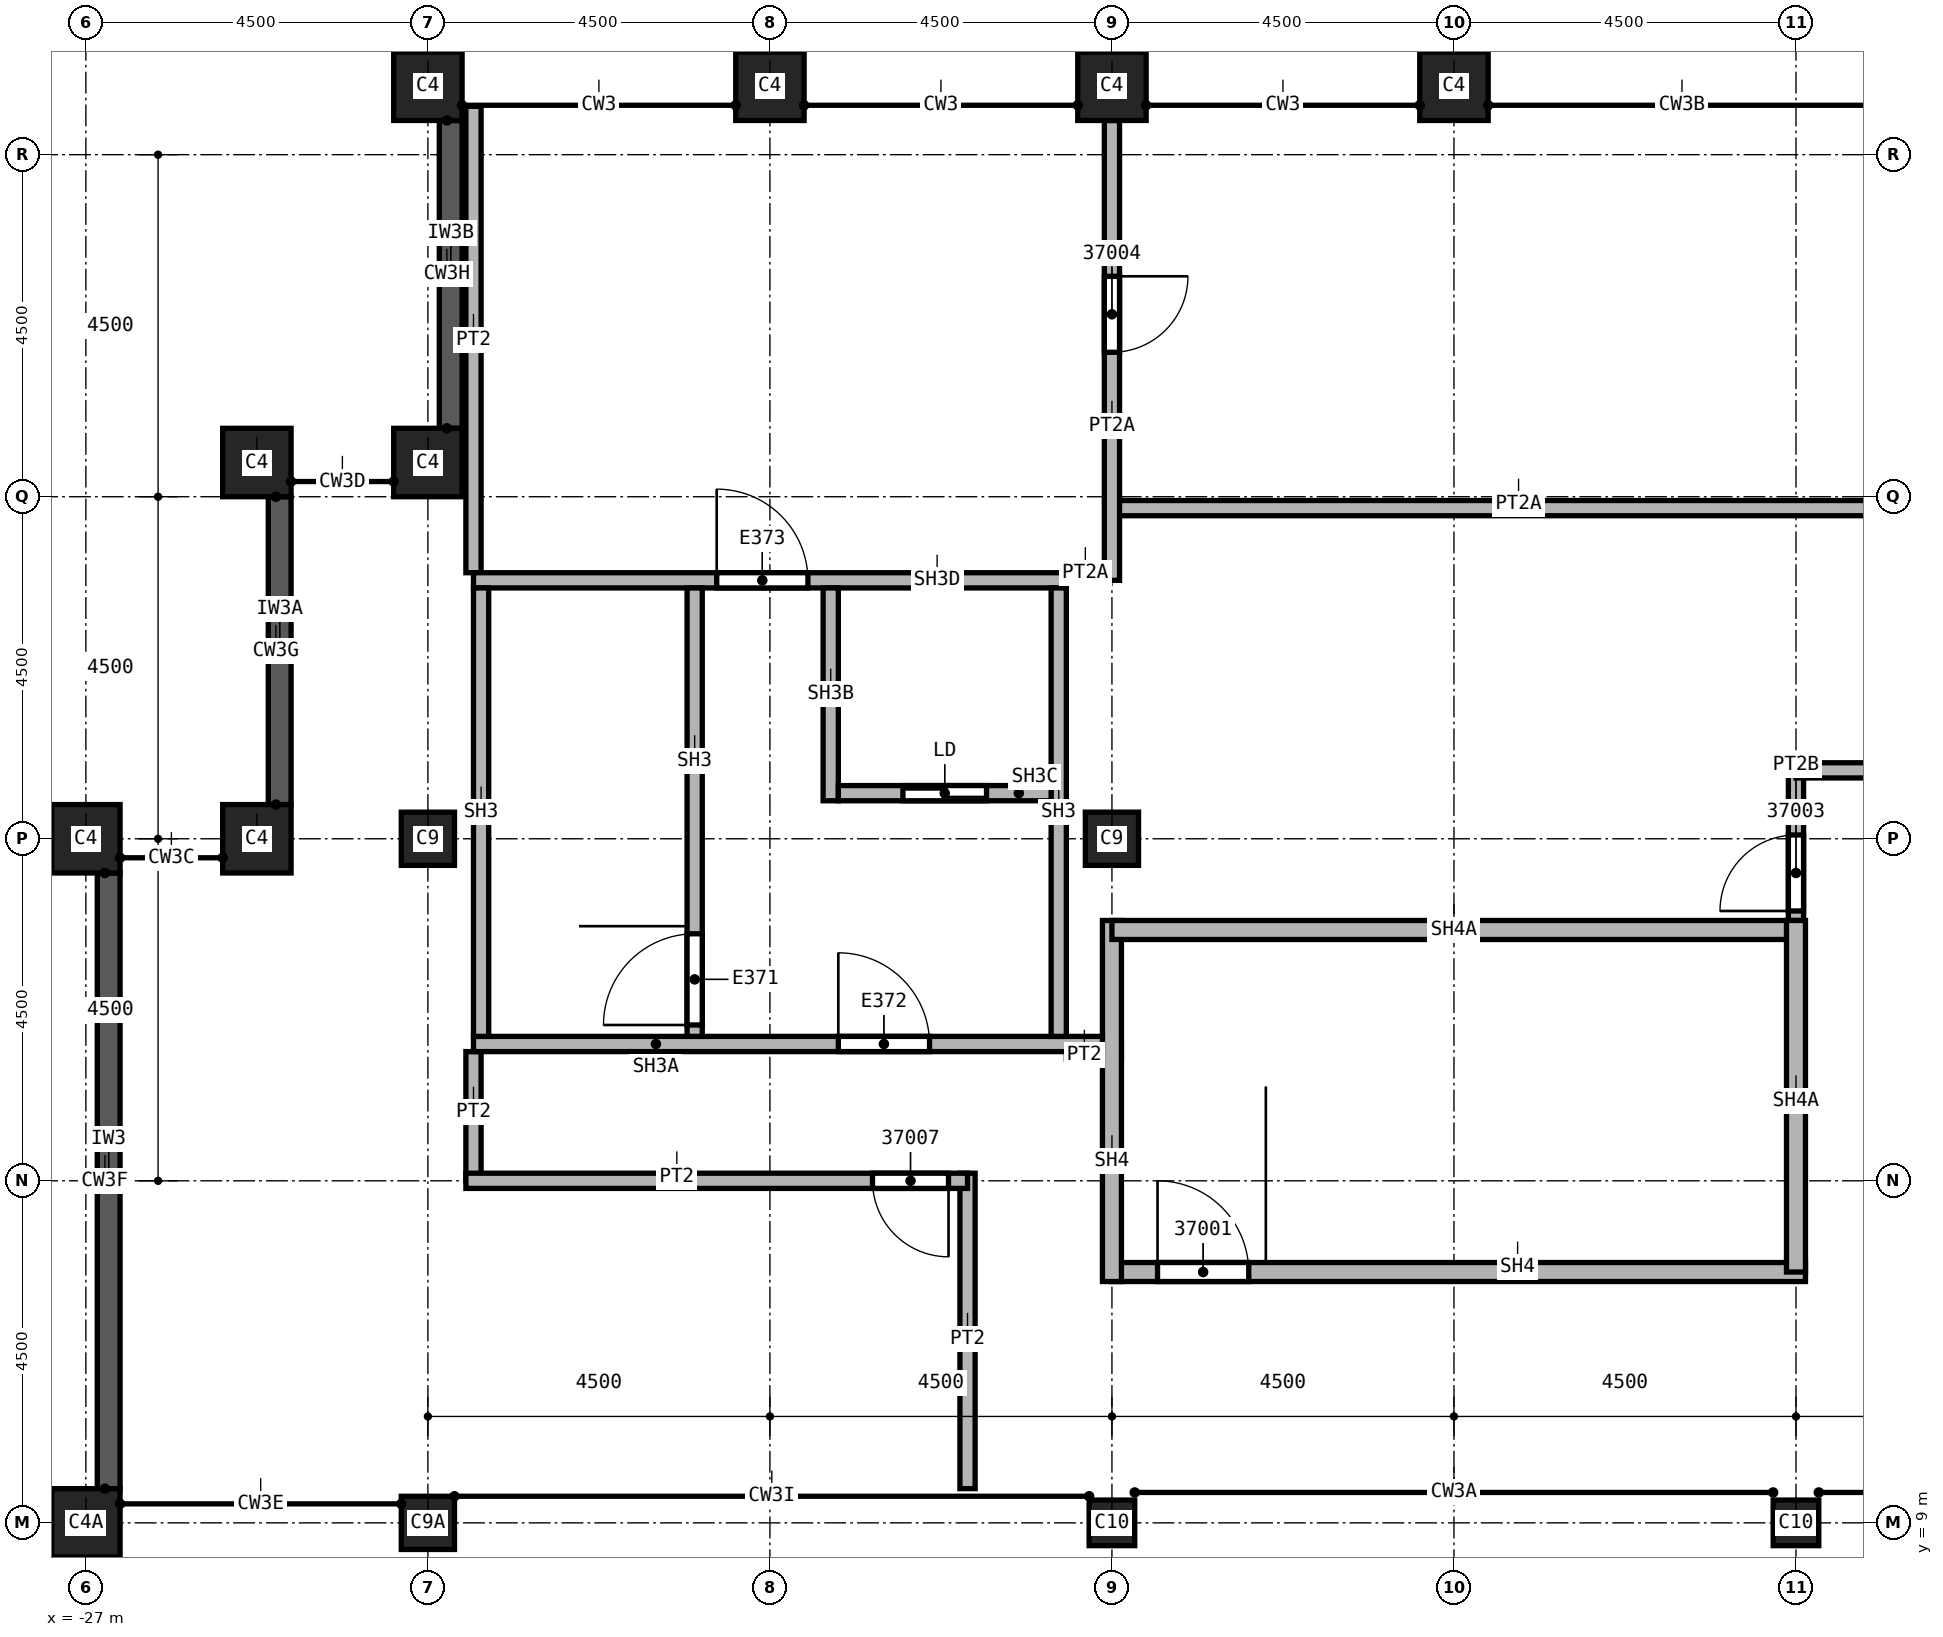
"""IFC4 building model, lengths in metres.
Left out: names, types, materials, properties, quantities, classifications, styles, units other than length and angle.
Written with IfcOpenShell. Run it as: python <this file> out.ifc"""

import sys

from ifc_helpers import new_model, si_unit, direction, frame, frame_2d, origin, origin_2d, place, context, subcontext, project, spatial, polyline, rectangle, outline, extrude, element, fill, save


model = new_model("IFC4")
c1 = context("Model", 3, precision=1e-05, world=origin(), true_north=direction((0.0, 1.0)))
c2 = subcontext(c1, "Body", "Model", "MODEL_VIEW")
j1 = project(units=[si_unit("LENGTHUNIT", "METRE"), si_unit("PLANEANGLEUNIT", "RADIAN")], contexts=[c1])
p1 = place(None, origin())
s1 = spatial("IfcSite", under=j1, at=p1, CompositionType="ELEMENT")
p2 = place(p1, origin())
s2 = spatial("IfcBuilding", under=s1, at=p2, CompositionType="ELEMENT")
p3 = place(p2, frame((0.0, 0.0, 386.0)))
s3 = spatial("IfcBuildingStorey", under=s2, at=p3, CompositionType="ELEMENT", Elevation=386.0)
p4 = place(p3, frame((-13.5, 18.0, 0.0), z_axis=(0.0, 0.0, 1.0), x_axis=(1.0, 0.0, 0.0)))
e1 = element("IfcColumn", 1, at=p4, inside=s3, PredefinedType="COLUMN", context=c2, shape_type="SweptSolid", body=[
    extrude(rectangle(XDim=0.7, YDim=0.7, at=origin_2d()), origin(), (0.0, 0.0, 1.0), 5.0),
])
p5 = place(p3, frame((-22.5, 9.0, 0.0), z_axis=(0.0, 0.0, 1.0), x_axis=(1.0, 0.0, 0.0)))
e2 = element("IfcColumn", 2, at=p5, inside=s3, PredefinedType="COLUMN", context=c2, shape_type="SweptSolid", body=[
    extrude(rectangle(XDim=0.7, YDim=0.7, at=origin_2d()), origin(), (0.0, 0.0, 1.0), 2.113),
])
p6 = place(p3, frame((-22.5, 18.0, 0.0), z_axis=(0.0, 0.0, 1.0), x_axis=(1.0, 0.0, 0.0)))
e3 = element("IfcColumn", 3, at=p6, inside=s3, PredefinedType="COLUMN", context=c2, shape_type="SweptSolid", body=[
    extrude(rectangle(XDim=0.7, YDim=0.7, at=origin_2d()), origin(), (0.0, 0.0, 1.0), 5.0),
])
for number, where, z_axis, x_axis in (
    (4, (-4.5, 9.0, 0.0), (0.0, 0.0, 1.0), (1.0, 0.0, 0.0)),
    (5, (-13.5, 9.0, 0.0), (0.0, 0.0, 1.0), (1.0, 0.0, 0.0)),
):
    element("IfcColumn", number, at=place(p3, frame(where, z_axis=z_axis, x_axis=x_axis)), inside=s3, PredefinedType="COLUMN", context=c2, shape_type="SweptSolid", body=[
        extrude(rectangle(XDim=0.6, YDim=0.6, at=origin_2d()), origin(), (0.0, 0.0, 1.0), 2.113),
    ])
for number, where, z_axis, x_axis in (
    (6, (-9.0, 27.9, 0.0), (0.0, 0.0, 1.0), (1.0, 0.0, 0.0)),
    (7, (-13.5, 27.9, 0.0), (0.0, 0.0, 1.0), (1.0, 0.0, 0.0)),
    (8, (-18.0, 27.9, 0.0), (0.0, 0.0, 1.0), (1.0, 0.0, 0.0)),
    (9, (-22.5, 27.9, 0.0), (0.0, 0.0, 1.0), (1.0, 0.0, 0.0)),
):
    element("IfcColumn", number, at=place(p3, frame(where, z_axis=z_axis, x_axis=x_axis)), inside=s3, PredefinedType="COLUMN", context=c2, shape_type="SweptSolid", body=[
        extrude(rectangle(XDim=0.9, YDim=0.9, at=origin_2d()), origin(), (0.0, 0.0, 1.0), 5.0),
    ])
p7 = place(p3, frame((-27.0, 9.0, 0.0), z_axis=(0.0, 0.0, 1.0), x_axis=(0.0, 1.0, 0.0)))
e10 = element("IfcColumn", 10, at=p7, inside=s3, PredefinedType="COLUMN", context=c2, shape_type="SweptSolid", body=[
    extrude(rectangle(XDim=0.9, YDim=0.9, at=origin_2d()), origin(), (0.0, 0.0, 1.0), 2.113),
])
for number, where, z_axis, x_axis in (
    (11, (-27.0, 18.0, 0.0), (0.0, 0.0, 1.0), (0.0, 1.0, 0.0)),
    (12, (-22.5, 22.95, 0.0), (0.0, 0.0, 1.0), (1.0, 0.0, 0.0)),
    (13, (-24.75, 22.95, 0.0), (0.0, 0.0, 1.0), (1.0, 0.0, 0.0)),
    (14, (-24.75, 18.0, 0.0), (0.0, 0.0, 1.0), (1.0, 0.0, 0.0)),
):
    element("IfcColumn", number, at=place(p3, frame(where, z_axis=z_axis, x_axis=x_axis)), inside=s3, PredefinedType="COLUMN", context=c2, shape_type="SweptSolid", body=[
        extrude(rectangle(XDim=0.9, YDim=0.9, at=origin_2d()), origin(), (0.0, 0.0, 1.0), 5.0),
    ])
p8 = place(p3, frame((-24.45, 22.5, 7.02), z_axis=(0.0, 0.0, 1.0), x_axis=(0.0, -1.0, 0.0)))
e15 = element("IfcWall", 15, at=p8, inside=s3, PredefinedType="SOLIDWALL", context=c2, shape_type="SweptSolid", body=[
    extrude(outline(polyline([(0.0, 0.0), (4.05, 0.0), (4.05, 0.05), (0.0, 1.841), (0.0, 0.0)])), frame((0.0, 0.15, 0.0), z_axis=(0.0, -1.0, 0.0), x_axis=(1.0, 0.0, 0.0)), (0.0, 0.0, 1.0), 0.3),
])
p9 = place(p3, frame((-26.7, 17.55, 2.826), z_axis=(0.0, 0.0, 1.0), x_axis=(0.0, -1.0, 0.0)))
e16 = element("IfcWall", 16, at=p9, inside=s3, PredefinedType="SOLIDWALL", context=c2, shape_type="SweptSolid", body=[
    extrude(outline(polyline([(0.0, 0.0), (8.1, 0.0), (8.1, 0.05), (0.0, 3.728), (0.0, 0.0)])), frame((0.0, 0.15, 0.0), z_axis=(0.0, -1.0, 0.0), x_axis=(1.0, 0.0, 0.0)), (0.0, 0.0, 1.0), 0.3),
])
p10 = place(p3, frame((-22.2, 27.45, 9.326), z_axis=(0.0, 0.0, 1.0), x_axis=(0.0, -1.0, 0.0)))
e17 = element("IfcWall", 17, at=p10, inside=s3, PredefinedType="SOLIDWALL", context=c2, shape_type="SweptSolid", body=[
    extrude(outline(polyline([(0.0, 0.0), (4.05, 0.0), (4.05, 0.05), (0.0, 1.841), (0.0, 0.0)])), frame((0.0, 0.15, 0.0), z_axis=(0.0, -1.0, 0.0), x_axis=(1.0, 0.0, 0.0)), (0.0, 0.0, 1.0), 0.3),
])
p11 = place(p3, frame((-21.9, 13.5, 0.0), z_axis=(0.0, 0.0, 1.0), x_axis=(0.0, 1.0, 0.0)))
e18 = element("IfcWall", 18, at=p11, inside=s3, PredefinedType="PARTITIONING", context=c2, shape_type="SweptSolid", body=[
    extrude(rectangle(XDim=1.7, YDim=0.2, at=frame_2d((0.85, 0.0))), origin(), (0.0, 0.0, 1.0), 2.953),
])
p12 = place(p3, frame((-21.9, 21.5, 0.0), z_axis=(0.0, 0.0, 1.0), x_axis=(0.0, 1.0, 0.0)))
e19 = element("IfcWall", 19, at=p12, inside=s3, PredefinedType="PARTITIONING", context=c2, shape_type="SweptSolid", body=[
    extrude(rectangle(XDim=6.136, YDim=0.2, at=frame_2d((3.068, 0.0))), origin(), (0.0, 0.0, 1.0), 2.953),
])
p13 = place(p3, frame((-15.4, 9.45, 0.0), z_axis=(0.0, 0.0, 1.0), x_axis=(0.0, 1.0, 0.0)))
e20 = element("IfcWall", 20, at=p13, inside=s3, PredefinedType="PARTITIONING", context=c2, shape_type="SweptSolid", body=[
    extrude(rectangle(XDim=4.15, YDim=0.2, at=frame_2d((2.075, 0.0))), origin(), (0.0, 0.0, 1.0), 2.953),
])
p14 = place(p3, frame((-15.4, 13.5, 0.0), z_axis=(0.0, 0.0, 1.0), x_axis=(-1.0, 0.0, 0.0)))
e21 = element("IfcWall", 21, at=p14, inside=s3, PredefinedType="PARTITIONING", context=c2, shape_type="SweptSolid", body=[
    extrude(rectangle(XDim=6.6, YDim=0.2, at=frame_2d((3.3, 0.0))), origin(), (0.0, 0.0, 1.0), 2.953),
])
p15 = place(p14, frame((0.25, 0.0, 0.0)))
e22 = element("IfcOpeningElement", 22, at=p15, cuts=e21, PredefinedType="OPENING", context=c2, shape_type="SweptSolid", body=[
    extrude(rectangle(XDim=1.0, YDim=2.1, at=frame_2d((0.5, 1.05))), frame((0.0, 0.1, 0.0), z_axis=(0.0, -1.0, 0.0), x_axis=(1.0, 0.0, 0.0)), (0.0, 0.0, 1.0), 0.2),
])
p16 = place(p3, frame((-14.1, 15.2, 0.0), z_axis=(0.0, 0.0, 1.0), x_axis=(1.0, 0.0, 0.0)))
e23 = element("IfcWall", 23, at=p16, inside=s3, PredefinedType="PARTITIONING", context=c2, shape_type="SweptSolid", body=[
    extrude(rectangle(XDim=0.725, YDim=0.2, at=frame_2d((0.363, 0.0))), origin(), (0.0, 0.0, 1.0), 2.953),
])
p17 = place(p3, frame((-13.5, 21.5, 0.0), z_axis=(0.0, 0.0, 1.0), x_axis=(-1.0, 0.0, 0.0)))
e24 = element("IfcWall", 24, at=p17, inside=s3, PredefinedType="PARTITIONING", context=c2, shape_type="SweptSolid", body=[
    extrude(rectangle(XDim=0.6, YDim=0.2, at=frame_2d((0.3, 0.0))), origin(), (0.0, 0.0, 1.0), 5.632),
])
p18 = place(p3, frame((-13.5, 22.35, 0.0), z_axis=(0.0, 0.0, 1.0), x_axis=(1.0, 0.0, 0.0)))
e25 = element("IfcWall", 25, at=p18, inside=s3, PredefinedType="PARTITIONING", context=c2, shape_type="SweptSolid", body=[
    extrude(rectangle(XDim=10.6, YDim=0.2, at=frame_2d((5.3, 0.0))), origin(), (0.0, 0.0, 1.0), 5.632),
])
p19 = place(p3, frame((-13.5, 27.45, 0.0), z_axis=(0.0, 0.0, 1.0), x_axis=(0.0, -1.0, 0.0)))
e26 = element("IfcWall", 26, at=p19, inside=s3, PredefinedType="PARTITIONING", context=c2, shape_type="SweptSolid", body=[
    extrude(rectangle(XDim=6.05, YDim=0.2, at=frame_2d((3.025, 0.0))), origin(), (0.0, 0.0, 1.0), 5.632),
])
p20 = place(p19, frame((2.05, 0.0, 0.0)))
e27 = element("IfcOpeningElement", 27, at=p20, cuts=e26, PredefinedType="OPENING", context=c2, shape_type="SweptSolid", body=[
    extrude(rectangle(XDim=1.0, YDim=2.1, at=frame_2d((0.5, 1.05))), frame((0.0, 0.1, 0.0), z_axis=(0.0, -1.0, 0.0), x_axis=(1.0, 0.0, 0.0)), (0.0, 0.0, 1.0), 0.2),
])
p21 = place(p3, frame((-4.5, 16.8, 0.0), z_axis=(0.0, 0.0, 1.0), x_axis=(0.0, 1.0, 0.0)))
e28 = element("IfcWall", 28, at=p21, inside=s3, PredefinedType="PARTITIONING", context=c2, shape_type="SweptSolid", body=[
    extrude(rectangle(XDim=2.2, YDim=0.2, at=frame_2d((1.1, 0.0))), origin(), (0.0, 0.0, 1.0), 4.281),
])
p22 = place(p21, frame((0.25, 0.0, 0.0)))
e29 = element("IfcOpeningElement", 29, at=p22, cuts=e28, PredefinedType="OPENING", context=c2, shape_type="SweptSolid", body=[
    extrude(rectangle(XDim=1.0, YDim=2.1, at=frame_2d((0.5, 1.05))), frame((0.0, 0.1, 0.0), z_axis=(0.0, -1.0, 0.0), x_axis=(1.0, 0.0, 0.0)), (0.0, 0.0, 1.0), 0.2),
])
p23 = place(p3, frame((-4.5, 18.9, 0.0), z_axis=(0.0, 0.0, 1.0), x_axis=(1.0, 0.0, 0.0)))
e30 = element("IfcWall", 30, at=p23, inside=s3, PredefinedType="PARTITIONING", context=c2, shape_type="SweptSolid", body=[
    extrude(rectangle(XDim=9.1, YDim=0.2, at=frame_2d((4.55, 0.0))), origin(), (0.0, 0.0, 1.0), 4.281),
])
p24 = place(p3, frame((-13.5, 12.3, 0.0), z_axis=(0.0, 0.0, 1.0), x_axis=(1.0, 0.0, 0.0)))
e31 = element("IfcWall", 31, at=p24, inside=s3, PredefinedType="SOLIDWALL", context=c2, shape_type="SweptSolid", body=[
    extrude(rectangle(XDim=9.125, YDim=0.25, at=frame_2d((4.562, 0.0))), origin(), (0.0, 0.0, 1.0), 2.953),
])
p25 = place(p24, frame((0.6, 0.0, 0.0)))
e32 = element("IfcOpeningElement", 32, at=p25, cuts=e31, PredefinedType="OPENING", context=c2, shape_type="SweptSolid", body=[
    extrude(rectangle(XDim=1.2, YDim=2.1, at=frame_2d((0.6, 1.05))), frame((0.0, 0.125, 0.0), z_axis=(0.0, -1.0, 0.0), x_axis=(1.0, 0.0, 0.0)), (0.0, 0.0, 1.0), 0.25),
])
p26 = place(p3, frame((-13.5, 12.175, 0.0), z_axis=(0.0, 0.0, 1.0), x_axis=(0.0, 1.0, 0.0)))
e33 = element("IfcWall", 33, at=p26, inside=s3, PredefinedType="SOLIDWALL", context=c2, shape_type="SweptSolid", body=[
    extrude(rectangle(XDim=4.75, YDim=0.25, at=frame_2d((2.375, 0.0))), origin(), (0.0, 0.0, 1.0), 2.953),
])
p27 = place(p3, frame((-13.5, 16.8, 0.0), z_axis=(0.0, 0.0, 1.0), x_axis=(1.0, 0.0, 0.0)))
e34 = element("IfcWall", 34, at=p27, inside=s3, PredefinedType="SOLIDWALL", context=c2, shape_type="SweptSolid", body=[
    extrude(rectangle(XDim=9.1, YDim=0.25, at=frame_2d((4.55, 0.0))), origin(), (0.0, 0.0, 1.0), 4.281),
])
p28 = place(p3, frame((-4.5, 16.925, 0.0), z_axis=(0.0, 0.0, 1.0), x_axis=(0.0, -1.0, 0.0)))
e35 = element("IfcWall", 35, at=p28, inside=s3, PredefinedType="SOLIDWALL", context=c2, shape_type="SweptSolid", body=[
    extrude(rectangle(XDim=4.625, YDim=0.25, at=frame_2d((2.312, 0.0))), origin(), (0.0, 0.0, 1.0), 4.281),
])
p29 = place(p3, frame((-21.9, 15.3, 0.0), z_axis=(0.0, 0.0, 1.0), x_axis=(1.0, 0.0, 0.0)))
e36 = element("IfcWall", 36, at=p29, inside=s3, PredefinedType="SOLIDWALL", context=c2, shape_type="SweptSolid", body=[
    extrude(rectangle(XDim=8.275, YDim=0.2, at=frame_2d((4.137, 0.0))), origin(), (0.0, 0.0, 1.0), 5.679),
])
p30 = place(p29, frame((4.8, 0.0, 0.0)))
e37 = element("IfcOpeningElement", 37, at=p30, cuts=e36, PredefinedType="OPENING", context=c2, shape_type="SweptSolid", body=[
    extrude(rectangle(XDim=1.2, YDim=2.1, at=frame_2d((0.6, 1.05))), frame((0.0, 0.1, 0.0), z_axis=(0.0, -1.0, 0.0), x_axis=(1.0, 0.0, 0.0)), (0.0, 0.0, 1.0), 0.2),
])
p31 = place(p3, frame((-21.9, 21.4, 0.0), z_axis=(0.0, 0.0, 1.0), x_axis=(1.0, 0.0, 0.0)))
e38 = element("IfcWall", 38, at=p31, inside=s3, PredefinedType="SOLIDWALL", context=c2, shape_type="SweptSolid", body=[
    extrude(rectangle(XDim=7.8, YDim=0.2, at=frame_2d((3.9, 0.0))), origin(), (0.0, 0.0, 1.0), 8.521),
])
p32 = place(p31, frame((3.2, 0.0, 0.0)))
e39 = element("IfcOpeningElement", 39, at=p32, cuts=e38, PredefinedType="OPENING", context=c2, shape_type="SweptSolid", body=[
    extrude(rectangle(XDim=1.2, YDim=2.1, at=frame_2d((0.6, 1.05))), frame((0.0, 0.1, 0.0), z_axis=(0.0, -1.0, 0.0), x_axis=(1.0, 0.0, 0.0)), (0.0, 0.0, 1.0), 0.2),
])
for number, where, z_axis, x_axis in (
    (40, (-21.8, 15.4, 0.0), (0.0, 0.0, 1.0), (0.0, 1.0, 0.0)),
    (41, (-14.2, 15.4, 0.0), (0.0, 0.0, 1.0), (0.0, 1.0, 0.0)),
):
    element("IfcWall", number, at=place(p3, frame(where, z_axis=z_axis, x_axis=x_axis)), inside=s3, PredefinedType="SOLIDWALL", context=c2, shape_type="SweptSolid", body=[
        extrude(rectangle(XDim=5.9, YDim=0.2, at=frame_2d((2.95, 0.0))), origin(), (0.0, 0.0, 1.0), 5.726),
    ])
p33 = place(p3, frame((-18.99, 15.4, 0.0), z_axis=(0.0, 0.0, 1.0), x_axis=(0.0, 1.0, 0.0)))
e42 = element("IfcWall", 42, at=p33, inside=s3, PredefinedType="SOLIDWALL", context=c2, shape_type="SweptSolid", body=[
    extrude(rectangle(XDim=5.9, YDim=0.2, at=frame_2d((2.95, 0.0))), origin(), (0.0, 0.0, 1.0), 5.726),
])
p34 = place(p33, frame((0.15, 0.0, 0.0)))
e43 = element("IfcOpeningElement", 43, at=p34, cuts=e42, PredefinedType="OPENING", context=c2, shape_type="SweptSolid", body=[
    extrude(rectangle(XDim=1.2, YDim=2.1, at=frame_2d((0.6, 1.05))), frame((0.0, 0.1, 0.0), z_axis=(0.0, -1.0, 0.0), x_axis=(1.0, 0.0, 0.0)), (0.0, 0.0, 1.0), 0.2),
])
p35 = place(p3, frame((-17.2, 18.5, 0.0), z_axis=(0.0, 0.0, 1.0), x_axis=(0.0, 1.0, 0.0)))
e44 = element("IfcWall", 44, at=p35, inside=s3, PredefinedType="SOLIDWALL", context=c2, shape_type="SweptSolid", body=[
    extrude(rectangle(XDim=2.8, YDim=0.2, at=frame_2d((1.4, 0.0))), origin(), (0.0, 0.0, 1.0), 7.17),
])
p36 = place(p3, frame((-17.1, 18.6, 0.0), z_axis=(0.0, 0.0, 1.0), x_axis=(1.0, 0.0, 0.0)))
e45 = element("IfcWall", 45, at=p36, inside=s3, PredefinedType="SOLIDWALL", context=c2, shape_type="SweptSolid", body=[
    extrude(rectangle(XDim=2.8, YDim=0.2, at=frame_2d((1.4, 0.0))), origin(), (0.0, 0.0, 1.0), 7.217),
])
p37 = place(p36, frame((0.85, 0.0, 0.0)))
e46 = element("IfcOpeningElement", 46, at=p37, cuts=e45, PredefinedType="OPENING", context=c2, shape_type="SweptSolid", body=[
    extrude(rectangle(XDim=1.1, YDim=2.1, at=frame_2d((0.55, 1.05))), frame((0.0, 0.1, 0.0), z_axis=(0.0, -1.0, 0.0), x_axis=(1.0, 0.0, 0.0)), (0.0, 0.0, 1.0), 0.2),
])
p38 = place(p25, origin())
e47 = element("IfcDoor", 47, at=p38, inside=s3, OperationType="SINGLE_SWING_RIGHT", PredefinedType="DOOR", context=c2, shape_type="SweptSolid", body=[
    extrude(rectangle(XDim=1.2, YDim=2.1, at=frame_2d((0.6, 1.05))), frame((0.0, 0.025, 0.0), z_axis=(0.0, -1.0, 0.0), x_axis=(1.0, 0.0, 0.0)), (0.0, 0.0, 1.0), 0.05),
])
fill(e32, e47)
p39 = place(p22, origin())
e48 = element("IfcDoor", 48, at=p39, inside=s3, OperationType="SINGLE_SWING_RIGHT", PredefinedType="DOOR", context=c2, shape_type="SweptSolid", body=[
    extrude(rectangle(XDim=1.0, YDim=2.1, at=frame_2d((0.5, 1.05))), frame((0.0, 0.025, 0.0), z_axis=(0.0, -1.0, 0.0), x_axis=(1.0, 0.0, 0.0)), (0.0, 0.0, 1.0), 0.05),
])
fill(e29, e48)
p40 = place(p20, origin())
e49 = element("IfcDoor", 49, at=p40, inside=s3, OperationType="SINGLE_SWING_LEFT", PredefinedType="DOOR", context=c2, shape_type="SweptSolid", body=[
    extrude(rectangle(XDim=1.0, YDim=2.1, at=frame_2d((0.5, 1.05))), frame((0.0, 0.025, 0.0), z_axis=(0.0, -1.0, 0.0), x_axis=(1.0, 0.0, 0.0)), (0.0, 0.0, 1.0), 0.05),
])
fill(e27, e49)
p41 = place(p15, origin())
e50 = element("IfcDoor", 50, at=p41, inside=s3, OperationType="SINGLE_SWING_RIGHT", PredefinedType="DOOR", context=c2, shape_type="SweptSolid", body=[
    extrude(rectangle(XDim=1.0, YDim=2.1, at=frame_2d((0.5, 1.05))), frame((0.0, 0.025, 0.0), z_axis=(0.0, -1.0, 0.0), x_axis=(1.0, 0.0, 0.0)), (0.0, 0.0, 1.0), 0.05),
])
fill(e22, e50)
p42 = place(p34, origin())
e51 = element("IfcDoor", 51, at=p42, inside=s3, OperationType="SINGLE_SWING_LEFT", PredefinedType="DOOR", context=c2, shape_type="SweptSolid", body=[
    extrude(rectangle(XDim=1.2, YDim=2.1, at=frame_2d((0.6, 1.05))), frame((0.0, 0.025, 0.0), z_axis=(0.0, -1.0, 0.0), x_axis=(1.0, 0.0, 0.0)), (0.0, 0.0, 1.0), 0.05),
])
fill(e43, e51)
p43 = place(p37, origin())
e52 = element("IfcDoor", 52, at=p43, inside=s3, OperationType="SLIDING_TO_LEFT", PredefinedType="DOOR", context=c2, shape_type="SweptSolid", body=[
    extrude(rectangle(XDim=1.1, YDim=2.1, at=frame_2d((0.55, 1.05))), frame((0.0, 0.025, 0.0), z_axis=(0.0, -1.0, 0.0), x_axis=(1.0, 0.0, 0.0)), (0.0, 0.0, 1.0), 0.05),
])
fill(e46, e52)
p44 = place(p30, origin())
e53 = element("IfcDoor", 53, at=p44, inside=s3, OperationType="SINGLE_SWING_RIGHT", PredefinedType="DOOR", context=c2, shape_type="SweptSolid", body=[
    extrude(rectangle(XDim=1.2, YDim=2.1, at=frame_2d((0.6, 1.05))), frame((0.0, 0.025, 0.0), z_axis=(0.0, -1.0, 0.0), x_axis=(1.0, 0.0, 0.0)), (0.0, 0.0, 1.0), 0.05),
])
fill(e37, e53)
p45 = place(p32, origin())
e54 = element("IfcDoor", 54, at=p45, inside=s3, OperationType="SINGLE_SWING_LEFT", PredefinedType="DOOR", context=c2, shape_type="SweptSolid", body=[
    extrude(rectangle(XDim=1.2, YDim=2.1, at=frame_2d((0.6, 1.05))), frame((0.0, 0.025, 0.0), z_axis=(0.0, -1.0, 0.0), x_axis=(1.0, 0.0, 0.0)), (0.0, 0.0, 1.0), 0.05),
])
fill(e39, e54)
save(model, sys.argv[1])
